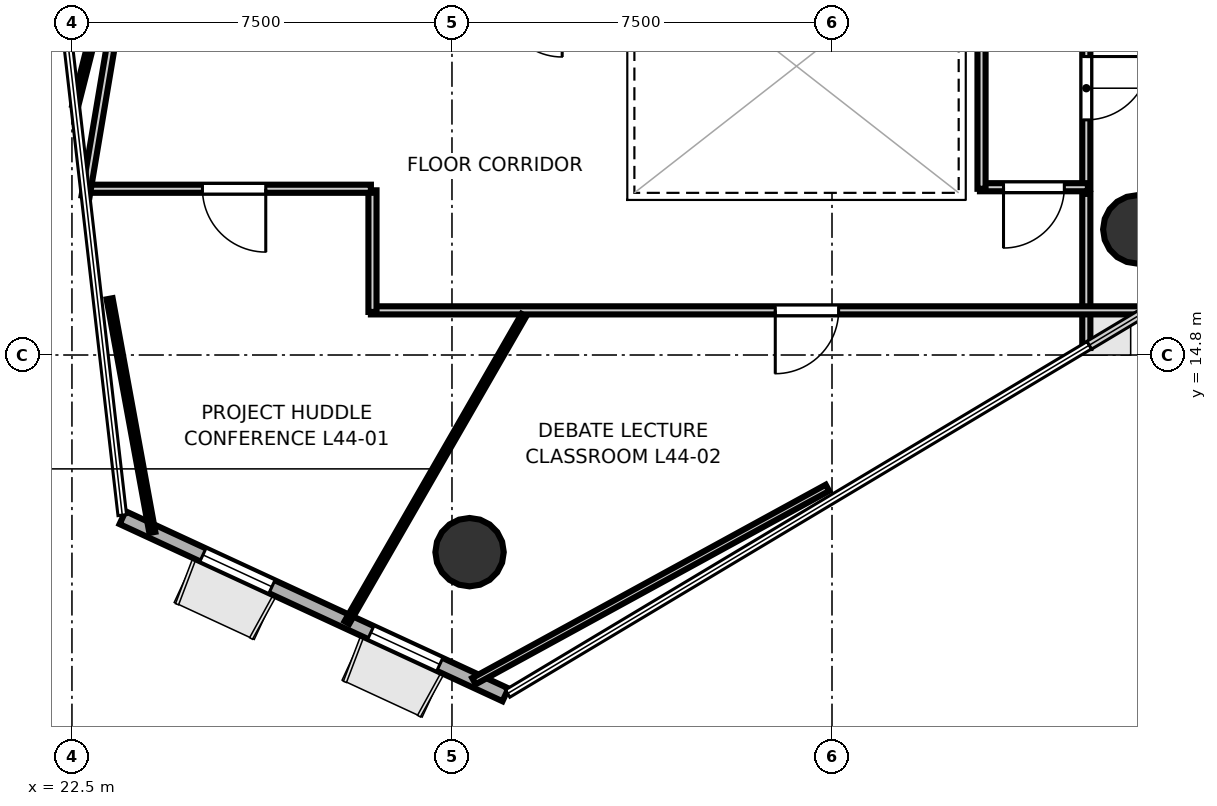
"""IFC4 building model, lengths in metres.
Left out: names, types, materials, properties, quantities, classifications, styles, units other than length and angle.
Written with IfcOpenShell. Run it as: python <this file> out.ifc"""

import sys

from ifc_helpers import new_model, si_unit, direction, frame, frame_2d, origin, origin_2d, place, context, subcontext, project, spatial, rectangle, hollow_circle, extrude, element, fill, save


model = new_model("IFC4")
c1 = context("Model", 3, precision=1e-05, world=origin(), true_north=direction((0.0, 1.0)))
c2 = subcontext(c1, "Body", "Model", "MODEL_VIEW")
j1 = project(units=[si_unit("LENGTHUNIT", "METRE"), si_unit("PLANEANGLEUNIT", "RADIAN")], contexts=[c1])
p1 = place(None, origin())
s1 = spatial("IfcSite", under=j1, at=p1, CompositionType="ELEMENT")
p2 = place(p1, origin())
s2 = spatial("IfcBuilding", under=s1, at=p2, CompositionType="ELEMENT")
p3 = place(p2, frame((0.0, 0.0, 173.5)))
s3 = spatial("IfcBuildingStorey", under=s2, at=p3, CompositionType="ELEMENT", Elevation=173.5)
for number, where, z_axis, x_axis in (
    (1, (30.347, 10.909, 0.0), (0.0, 0.0, 1.0), (1.0, 0.0, 0.0)),
    (2, (43.525, 17.279, 0.0), (0.0, 0.0, 1.0), (1.0, 0.0, 0.0)),
):
    element("IfcColumn", number, at=place(p3, frame(where, z_axis=z_axis, x_axis=x_axis)), inside=s3, PredefinedType="COLUMN", context=c2, shape_type="SweptSolid", body=[
        extrude(hollow_circle(Radius=0.675, WallThickness=0.032, at=origin_2d()), origin(), (0.0, 0.0, 1.0), 3.7),
    ])
p4 = place(p3, frame((23.499, 11.59, 0.0), z_axis=(0.0, 0.0, 1.0), x_axis=(0.907584865188, -0.419868684806, 0.0)))
e3 = element("IfcWall", 3, at=p4, inside=s3, PredefinedType="SOLIDWALL", context=c2, shape_type="SweptSolid", body=[
    extrude(rectangle(XDim=8.327, YDim=0.28, at=frame_2d((4.163, 0.0))), origin(), (0.0, 0.0, 1.0), 3.52),
])
p5 = place(p4, frame((1.748, 0.0, 0.85)))
e4 = element("IfcOpeningElement", 4, at=p5, cuts=e3, PredefinedType="OPENING", context=c2, shape_type="SweptSolid", body=[
    extrude(rectangle(XDim=1.5, YDim=2.1, at=frame_2d((0.75, 1.05))), frame((0.0, 0.15, 0.0), z_axis=(0.0, -1.0, 0.0), x_axis=(1.0, 0.0, 0.0)), (0.0, 0.0, 1.0), 0.3),
])
p6 = place(p4, frame((5.399, 0.0, 0.85)))
e5 = element("IfcOpeningElement", 5, at=p6, cuts=e3, PredefinedType="OPENING", context=c2, shape_type="SweptSolid", body=[
    extrude(rectangle(XDim=1.5, YDim=2.1, at=frame_2d((0.75, 1.05))), frame((0.0, 0.15, 0.0), z_axis=(0.0, -1.0, 0.0), x_axis=(1.0, 0.0, 0.0)), (0.0, 0.0, 1.0), 0.3),
])
p7 = place(p3, frame((42.519, 22.05, 0.0), z_axis=(0.0, 0.0, 1.0), x_axis=(0.0, -1.0, 0.0)))
e6 = element("IfcWall", 6, at=p7, inside=s3, PredefinedType="PARTITIONING", context=c2, shape_type="SweptSolid", body=[
    extrude(rectangle(XDim=3.97, YDim=0.16, at=frame_2d((1.985, 0.0))), origin(), (0.0, 0.0, 1.0), 2.84),
])
p8 = place(p7, frame((1.36, 0.0, 0.0)))
e7 = element("IfcOpeningElement", 7, at=p8, cuts=e6, PredefinedType="OPENING", context=c2, shape_type="SweptSolid", body=[
    extrude(rectangle(XDim=1.25, YDim=2.2, at=frame_2d((0.625, 1.1))), frame((0.0, 0.09, 0.0), z_axis=(0.0, -1.0, 0.0), x_axis=(1.0, 0.0, 0.0)), (0.0, 0.0, 1.0), 0.18),
])
p9 = place(p3, frame((42.55, 18.111, 0.0), z_axis=(0.0, 0.0, 1.0), x_axis=(-1.0, 0.0, 0.0)))
e8 = element("IfcWall", 8, at=p9, inside=s3, PredefinedType="PARTITIONING", context=c2, shape_type="SweptSolid", body=[
    extrude(rectangle(XDim=2.13, YDim=0.16, at=frame_2d((1.065, 0.0))), origin(), (0.0, 0.0, 1.0), 2.84),
])
p10 = place(p9, frame((0.465, 0.0, 0.0)))
e9 = element("IfcOpeningElement", 9, at=p10, cuts=e8, PredefinedType="OPENING", context=c2, shape_type="SweptSolid", body=[
    extrude(rectangle(XDim=1.2, YDim=2.15, at=frame_2d((0.6, 1.075))), frame((0.0, 0.09, 0.0), z_axis=(0.0, -1.0, 0.0), x_axis=(1.0, 0.0, 0.0)), (0.0, 0.0, 1.0), 0.18),
])
p11 = place(p3, frame((40.451, 18.08, 0.0), z_axis=(0.0, 0.0, 1.0), x_axis=(0.0, 1.0, 0.0)))
e10 = element("IfcWall", 10, at=p11, inside=s3, PredefinedType="PARTITIONING", context=c2, shape_type="SweptSolid", body=[
    extrude(rectangle(XDim=3.32, YDim=0.16, at=frame_2d((1.66, 0.0))), origin(), (0.0, 0.0, 1.0), 2.84),
])
p12 = place(p3, frame((42.519, 17.98, 0.0), z_axis=(0.0, 0.0, 1.0), x_axis=(0.0, -1.0, 0.0)))
e11 = element("IfcWall", 11, at=p12, inside=s3, PredefinedType="PARTITIONING", context=c2, shape_type="SweptSolid", body=[
    extrude(rectangle(XDim=3.042, YDim=0.16, at=frame_2d((1.521, 0.0))), origin(), (0.0, 0.0, 1.0), 2.84),
])
p13 = place(p3, frame((43.746, 15.681, 0.0), z_axis=(0.0, 0.0, 1.0), x_axis=(-1.0, 0.0, 0.0)))
e12 = element("IfcWall", 12, at=p13, inside=s3, PredefinedType="PARTITIONING", context=c2, shape_type="SweptSolid", body=[
    extrude(rectangle(XDim=15.346, YDim=0.16, at=frame_2d((7.673, 0.0))), origin(), (0.0, 0.0, 1.0), 2.84),
])
p14 = place(p13, frame((6.115, 0.0, 0.0)))
e13 = element("IfcOpeningElement", 13, at=p14, cuts=e12, PredefinedType="OPENING", context=c2, shape_type="SweptSolid", body=[
    extrude(rectangle(XDim=1.25, YDim=2.2, at=frame_2d((0.625, 1.1))), frame((0.0, 0.09, 0.0), z_axis=(0.0, -1.0, 0.0), x_axis=(1.0, 0.0, 0.0)), (0.0, 0.0, 1.0), 0.18),
])
p15 = place(p3, frame((28.431, 15.65, 0.0), z_axis=(0.0, 0.0, 1.0), x_axis=(0.0, 1.0, 0.0)))
e14 = element("IfcWall", 14, at=p15, inside=s3, PredefinedType="PARTITIONING", context=c2, shape_type="SweptSolid", body=[
    extrude(rectangle(XDim=2.4, YDim=0.16, at=frame_2d((1.2, 0.0))), origin(), (0.0, 0.0, 1.0), 2.84),
])
p16 = place(p3, frame((28.4, 18.081, 0.0), z_axis=(0.0, 0.0, 1.0), x_axis=(-1.0, 0.0, 0.0)))
e15 = element("IfcWall", 15, at=p16, inside=s3, PredefinedType="PARTITIONING", context=c2, shape_type="SweptSolid", body=[
    extrude(rectangle(XDim=5.668, YDim=0.16, at=frame_2d((2.834, 0.0))), origin(), (0.0, 0.0, 1.0), 2.84),
])
p17 = place(p16, frame((2.075, 0.0, 0.0)))
e16 = element("IfcOpeningElement", 16, at=p17, cuts=e15, PredefinedType="OPENING", context=c2, shape_type="SweptSolid", body=[
    extrude(rectangle(XDim=1.25, YDim=2.2, at=frame_2d((0.625, 1.1))), frame((0.0, 0.09, 0.0), z_axis=(0.0, -1.0, 0.0), x_axis=(1.0, 0.0, 0.0)), (0.0, 0.0, 1.0), 0.18),
])
p18 = place(p3, frame((22.769, 17.934, 0.0), z_axis=(0.0, 0.0, 1.0), x_axis=(0.165701855885, 0.986175894532, 0.0)))
e17 = element("IfcWall", 17, at=p18, inside=s3, PredefinedType="PARTITIONING", context=c2, shape_type="SweptSolid", body=[
    extrude(rectangle(XDim=6.107, YDim=0.16, at=frame_2d((3.054, 0.0))), origin(), (0.0, 0.0, 1.0), 2.84),
])
p19 = place(p3, frame((31.419, 15.585, 0.0), z_axis=(0.0, 0.0, 1.0), x_axis=(-0.498998579132, -0.866602802917, 0.0)))
e18 = element("IfcWall", 18, at=p19, inside=s3, PredefinedType="PARTITIONING", context=c2, shape_type="SweptSolid", body=[
    extrude(rectangle(XDim=6.999, YDim=0.105, at=frame_2d((3.5, 0.0))), origin(), (0.0, 0.0, 1.0), 2.84),
])
p20 = place(p3, frame((24.087, 11.299, 0.0), z_axis=(0.0, 0.0, 1.0), x_axis=(-0.179902882401, 0.98368437667, 0.0)))
e19 = element("IfcWall", 19, at=p20, inside=s3, PredefinedType="PARTITIONING", context=c2, shape_type="SweptSolid", body=[
    extrude(rectangle(XDim=4.687, YDim=0.12, at=frame_2d((2.344, 0.0))), origin(), (0.0, 0.0, 1.0), 2.84),
])
p21 = place(p3, frame((37.41, 12.179, 0.0), z_axis=(0.0, 0.0, 1.0), x_axis=(-0.877383459181, -0.479789813934, 0.0)))
e20 = element("IfcWall", 20, at=p21, inside=s3, PredefinedType="PARTITIONING", context=c2, shape_type="SweptSolid", body=[
    extrude(rectangle(XDim=7.951, YDim=0.14, at=frame_2d((3.976, 0.0))), origin(), (0.0, 0.0, 1.0), 2.84),
])
p22 = place(p3, frame((23.341, 22.785, 0.0), z_axis=(0.0, 0.0, 1.0), x_axis=(-0.245347547792, -0.969435186483, 0.0)))
e21 = element("IfcWall", 21, at=p22, inside=s3, PredefinedType="PARTITIONING", context=c2, shape_type="SweptSolid", body=[
    extrude(rectangle(XDim=3.165, YDim=0.12, at=frame_2d((1.583, 0.0))), origin(), (0.0, 0.0, 1.0), 2.84),
])
p23 = place(p10, origin())
e22 = element("IfcDoor", 22, at=p23, inside=s3, OperationType="SINGLE_SWING_RIGHT", PredefinedType="DOOR", context=c2, shape_type="SweptSolid", body=[
    extrude(rectangle(XDim=1.2, YDim=2.15, at=frame_2d((0.6, 1.075))), frame((0.0, 0.025, 0.0), z_axis=(0.0, -1.0, 0.0), x_axis=(1.0, 0.0, 0.0)), (0.0, 0.0, 1.0), 0.05),
])
fill(e9, e22)
p24 = place(p17, origin())
e23 = element("IfcDoor", 23, at=p24, inside=s3, OperationType="SINGLE_SWING_LEFT", PredefinedType="DOOR", context=c2, shape_type="SweptSolid", body=[
    extrude(rectangle(XDim=1.25, YDim=2.2, at=frame_2d((0.625, 1.1))), frame((0.0, 0.025, 0.0), z_axis=(0.0, -1.0, 0.0), x_axis=(1.0, 0.0, 0.0)), (0.0, 0.0, 1.0), 0.05),
])
fill(e16, e23)
p25 = place(p14, origin())
e24 = element("IfcDoor", 24, at=p25, inside=s3, OperationType="SINGLE_SWING_RIGHT", PredefinedType="DOOR", context=c2, shape_type="SweptSolid", body=[
    extrude(rectangle(XDim=1.25, YDim=2.2, at=frame_2d((0.625, 1.1))), frame((0.0, 0.025, 0.0), z_axis=(0.0, -1.0, 0.0), x_axis=(1.0, 0.0, 0.0)), (0.0, 0.0, 1.0), 0.05),
])
fill(e13, e24)
p26 = place(p8, origin())
e25 = element("IfcDoor", 25, at=p26, inside=s3, OperationType="SINGLE_SWING_LEFT", PredefinedType="DOOR", context=c2, shape_type="SweptSolid", body=[
    extrude(rectangle(XDim=1.25, YDim=2.2, at=frame_2d((0.625, 1.1))), frame((0.0, 0.025, 0.0), z_axis=(0.0, -1.0, 0.0), x_axis=(1.0, 0.0, 0.0)), (0.0, 0.0, 1.0), 0.05),
])
fill(e7, e25)
p27 = place(p5, origin())
e26 = element("IfcWindow", 26, at=p27, inside=s3, PartitioningType="SINGLE_PANEL", PredefinedType="WINDOW", context=c2, shape_type="SweptSolid", body=[
    extrude(rectangle(XDim=1.5, YDim=2.1, at=frame_2d((0.75, 1.05))), frame((0.0, 0.03, 0.0), z_axis=(0.0, -1.0, 0.0), x_axis=(1.0, 0.0, 0.0)), (0.0, 0.0, 1.0), 0.06),
])
fill(e4, e26)
p28 = place(p6, origin())
e27 = element("IfcWindow", 27, at=p28, inside=s3, PartitioningType="SINGLE_PANEL", PredefinedType="WINDOW", context=c2, shape_type="SweptSolid", body=[
    extrude(rectangle(XDim=1.5, YDim=2.1, at=frame_2d((0.75, 1.05))), frame((0.0, 0.03, 0.0), z_axis=(0.0, -1.0, 0.0), x_axis=(1.0, 0.0, 0.0)), (0.0, 0.0, 1.0), 0.06),
])
fill(e5, e27)
save(model, sys.argv[1])
